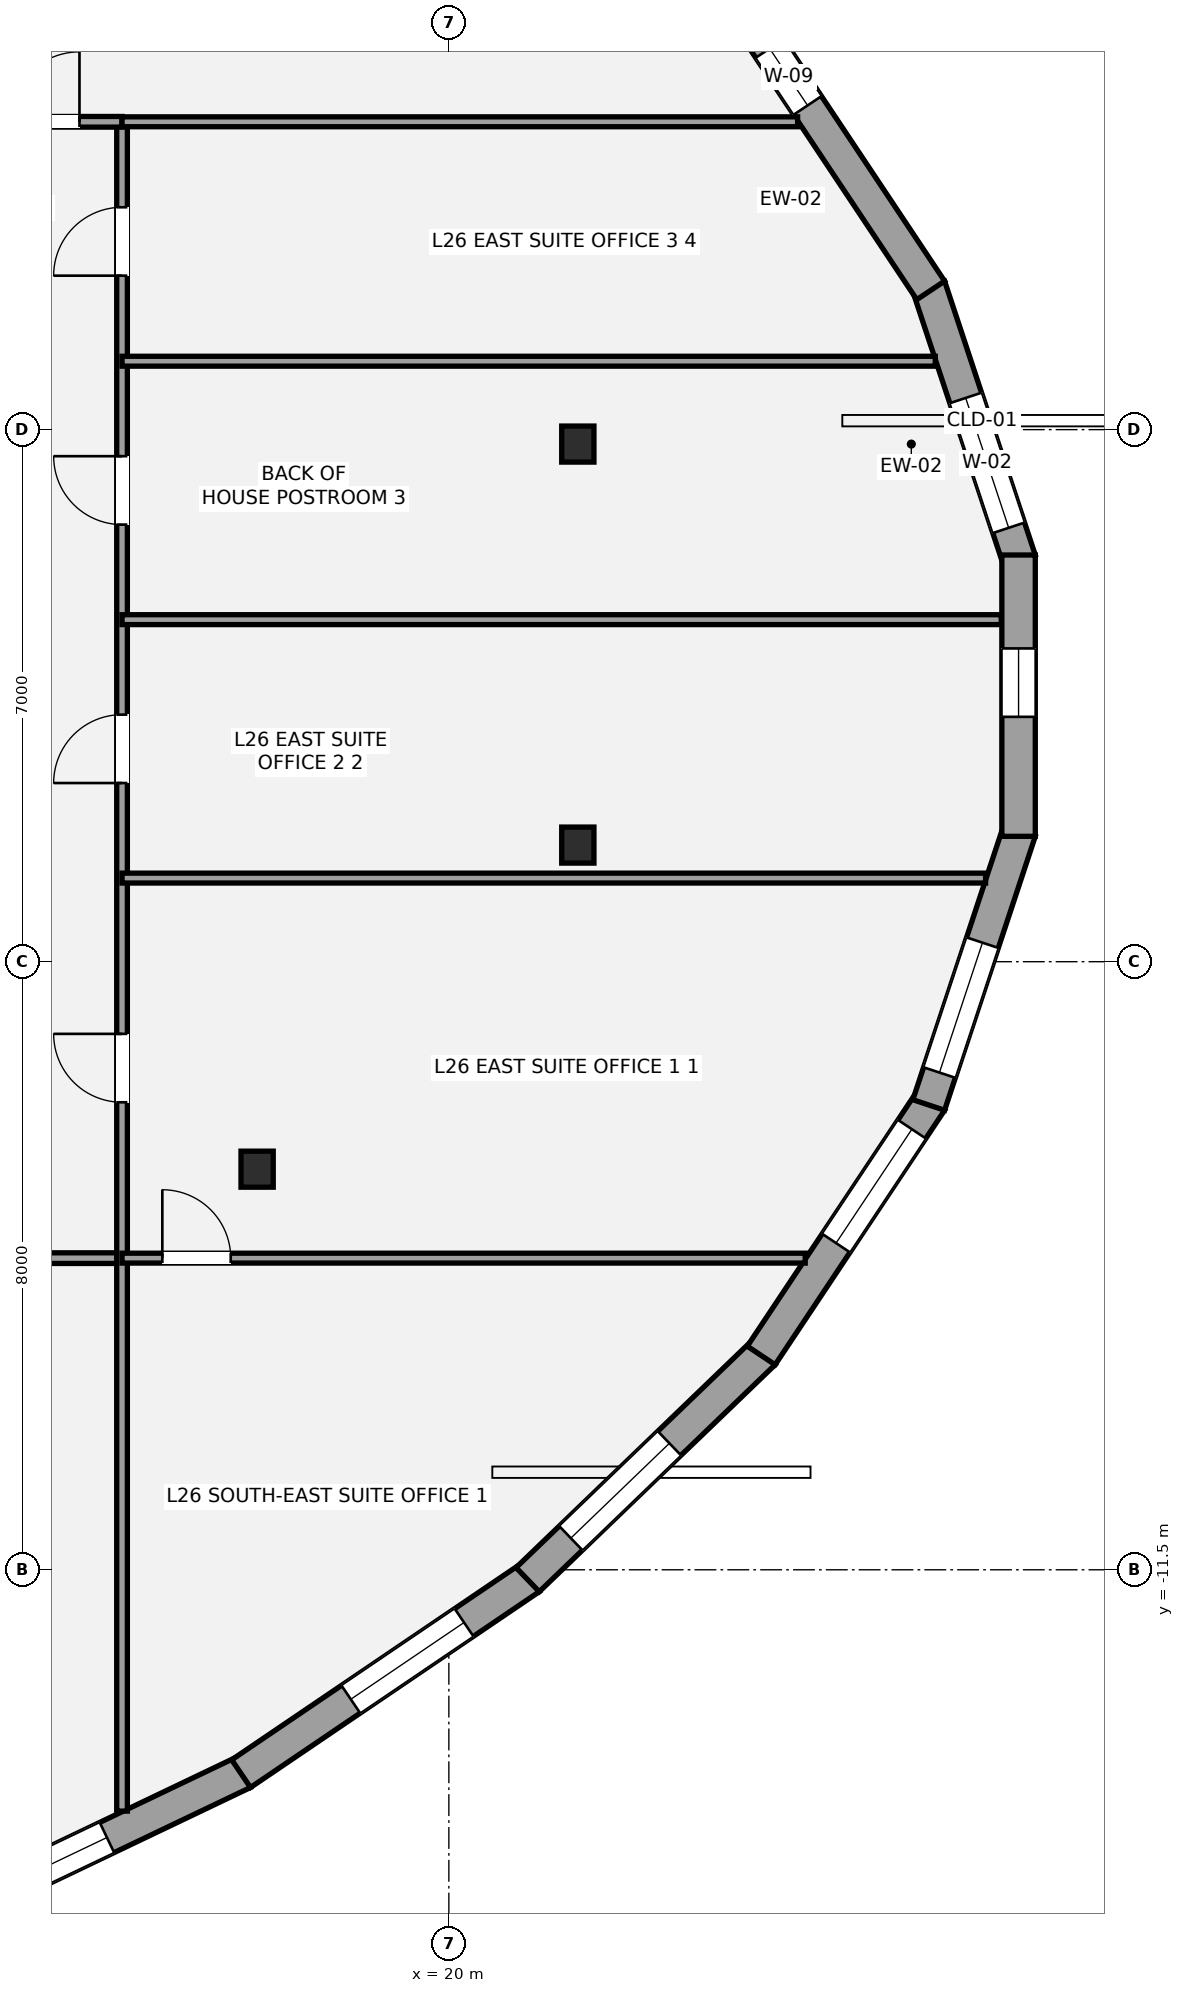
"""IFC4 building model, lengths in metres.
Left out: names, types, materials, properties, quantities, classifications, styles, units other than length and angle.
Written with IfcOpenShell. Run it as: python <this file> out.ifc"""

import sys

from ifc_helpers import new_model, si_unit, direction, frame, frame_2d, origin, origin_2d, place, context, subcontext, project, spatial, rectangle, i_section, extrude, element, fill, save


model = new_model("IFC4")
c1 = context("Model", 3, precision=1e-05, world=origin(), true_north=direction((0.0, 1.0)))
c2 = subcontext(c1, "Body", "Model", "MODEL_VIEW")
j1 = project(units=[si_unit("LENGTHUNIT", "METRE"), si_unit("PLANEANGLEUNIT", "RADIAN")], contexts=[c1])
p1 = place(None, origin())
s1 = spatial("IfcSite", under=j1, at=p1, CompositionType="ELEMENT")
p2 = place(p1, origin())
s2 = spatial("IfcBuilding", under=s1, at=p2, CompositionType="ELEMENT")
p3 = place(p2, frame((0.0, 0.0, 100.1)))
s3 = spatial("IfcBuildingStorey", under=s2, at=p3, CompositionType="ELEMENT", Elevation=100.1)
for number, where, z_axis, x_axis in (
    (1, (21.697, 3.31, 0.0), (0.0, 0.0, 1.0), (1.0, 0.0, 0.0)),
    (2, (17.477, -6.229, 0.0), (0.0, 0.0, 1.0), (1.0, 0.0, 0.0)),
    (3, (21.697, -1.966, 0.0), (0.0, 0.0, 1.0), (1.0, 0.0, 0.0)),
):
    element("IfcColumn", number, at=place(p3, frame(where, z_axis=z_axis, x_axis=x_axis)), inside=s3, PredefinedType="COLUMN", context=c2, shape_type="SweptSolid", body=[
        extrude(i_section(OverallWidth=0.424, OverallDepth=0.474, WebThickness=0.048, FlangeThickness=0.077, at=origin_2d()), origin(), (0.0, 0.0, 1.0), 3.5),
    ])
p4 = place(p3, frame((26.314, 5.385, 0.0), z_axis=(0.0, 0.0, 1.0), x_axis=(0.314316911692, -0.94931811266, 0.0)))
e4 = element("IfcWall", 4, at=p4, inside=s3, PredefinedType="STANDARD", context=c2, shape_type="SweptSolid", body=[
    extrude(rectangle(XDim=3.796, YDim=0.44, at=frame_2d((1.898, 0.0))), origin(), (0.0, 0.0, 1.0), 2.528),
])
p5 = place(p4, frame((1.547, 0.0, 0.65)))
e5 = element("IfcOpeningElement", 5, at=p5, cuts=e4, PredefinedType="OPENING", context=c2, shape_type="SweptSolid", body=[
    extrude(rectangle(XDim=1.8, YDim=1.7, at=frame_2d((0.9, 0.85))), frame((0.0, 0.23, 0.0), z_axis=(0.0, -1.0, 0.0), x_axis=(1.0, 0.0, 0.0)), (0.0, 0.0, 1.0), 0.46),
])
p6 = place(p3, frame((24.11, 8.68, 0.0), z_axis=(0.0, 0.0, 1.0), x_axis=(0.554293965046, -0.83232097193, 0.0)))
e6 = element("IfcWall", 6, at=p6, inside=s3, PredefinedType="STANDARD", context=c2, shape_type="SweptSolid", body=[
    extrude(rectangle(XDim=4.023, YDim=0.44, at=frame_2d((2.011, 0.0))), origin(), (0.0, 0.0, 1.0), 2.528),
])
p7 = place(p6, frame((0.2, 0.0, 0.58)))
e7 = element("IfcOpeningElement", 7, at=p7, cuts=e6, PredefinedType="OPENING", context=c2, shape_type="SweptSolid", body=[
    extrude(rectangle(XDim=0.9, YDim=1.35, at=frame_2d((0.45, 0.675))), frame((0.0, 0.23, 0.0), z_axis=(0.0, -1.0, 0.0), x_axis=(1.0, 0.0, 0.0)), (0.0, 0.0, 1.0), 0.46),
])
p8 = place(p3, frame((17.295, -14.166, 0.0), z_axis=(0.0, 0.0, 1.0), x_axis=(-0.902372757907, -0.430956385018, 0.0)))
e8 = element("IfcWall", 8, at=p8, inside=s3, PredefinedType="STANDARD", context=c2, shape_type="SweptSolid", body=[
    extrude(rectangle(XDim=4.882, YDim=0.44, at=frame_2d((2.441, 0.0))), origin(), (0.0, 0.0, 1.0), 2.528),
])
p9 = place(p8, frame((1.988, 0.0, 0.65)))
e9 = element("IfcOpeningElement", 9, at=p9, cuts=e8, PredefinedType="OPENING", context=c2, shape_type="SweptSolid", body=[
    extrude(rectangle(XDim=1.8, YDim=1.7, at=frame_2d((0.9, 0.85))), frame((0.0, 0.23, 0.0), z_axis=(0.0, -1.0, 0.0), x_axis=(1.0, 0.0, 0.0)), (0.0, 0.0, 1.0), 0.46),
])
p10 = place(p3, frame((21.066, -11.606, 0.0), z_axis=(0.0, 0.0, 1.0), x_axis=(-0.827754551165, -0.56109036975, 0.0)))
e10 = element("IfcWall", 10, at=p10, inside=s3, PredefinedType="STANDARD", context=c2, shape_type="SweptSolid", body=[
    extrude(rectangle(XDim=4.591, YDim=0.44, at=frame_2d((2.295, 0.0))), origin(), (0.0, 0.0, 1.0), 2.528),
])
p11 = place(p10, frame((1.047, 0.0, 0.65)))
e11 = element("IfcOpeningElement", 11, at=p11, cuts=e10, PredefinedType="OPENING", context=c2, shape_type="SweptSolid", body=[
    extrude(rectangle(XDim=1.8, YDim=1.7, at=frame_2d((0.9, 0.85))), frame((0.0, 0.23, 0.0), z_axis=(0.0, -1.0, 0.0), x_axis=(1.0, 0.0, 0.0)), (0.0, 0.0, 1.0), 0.46),
])
p12 = place(p3, frame((24.14, -8.644, 0.0), z_axis=(0.0, 0.0, 1.0), x_axis=(-0.720581378362, -0.693370375166, 0.0)))
e12 = element("IfcWall", 12, at=p12, inside=s3, PredefinedType="STANDARD", context=c2, shape_type="SweptSolid", body=[
    extrude(rectangle(XDim=4.307, YDim=0.44, at=frame_2d((2.153, 0.0))), origin(), (0.0, 0.0, 1.0), 2.528),
])
p13 = place(p12, frame((1.719, 0.0, 0.65)))
e13 = element("IfcOpeningElement", 13, at=p13, cuts=e12, PredefinedType="OPENING", context=c2, shape_type="SweptSolid", body=[
    extrude(rectangle(XDim=1.8, YDim=1.7, at=frame_2d((0.9, 0.85))), frame((0.0, 0.23, 0.0), z_axis=(0.0, -1.0, 0.0), x_axis=(1.0, 0.0, 0.0)), (0.0, 0.0, 1.0), 0.46),
])
p14 = place(p3, frame((26.34, -5.332, 0.0), z_axis=(0.0, 0.0, 1.0), x_axis=(-0.554293965046, -0.83232097193, 0.0)))
e14 = element("IfcWall", 14, at=p14, inside=s3, PredefinedType="STANDARD", context=c2, shape_type="SweptSolid", body=[
    extrude(rectangle(XDim=4.023, YDim=0.44, at=frame_2d((2.011, 0.0))), origin(), (0.0, 0.0, 1.0), 2.528),
])
p15 = place(p14, frame((0.446, 0.0, 0.65)))
e15 = element("IfcOpeningElement", 15, at=p15, cuts=e14, PredefinedType="OPENING", context=c2, shape_type="SweptSolid", body=[
    extrude(rectangle(XDim=1.8, YDim=1.7, at=frame_2d((0.9, 0.85))), frame((0.0, 0.23, 0.0), z_axis=(0.0, -1.0, 0.0), x_axis=(1.0, 0.0, 0.0)), (0.0, 0.0, 1.0), 0.46),
])
p16 = place(p3, frame((27.507, -1.781, 0.0), z_axis=(0.0, 0.0, 1.0), x_axis=(-0.314316911692, -0.94931811266, 0.0)))
e16 = element("IfcWall", 16, at=p16, inside=s3, PredefinedType="STANDARD", context=c2, shape_type="SweptSolid", body=[
    extrude(rectangle(XDim=3.796, YDim=0.44, at=frame_2d((1.898, 0.0))), origin(), (0.0, 0.0, 1.0), 2.528),
])
p17 = place(p16, frame((1.547, 0.0, 0.65)))
e17 = element("IfcOpeningElement", 17, at=p17, cuts=e16, PredefinedType="OPENING", context=c2, shape_type="SweptSolid", body=[
    extrude(rectangle(XDim=1.8, YDim=1.7, at=frame_2d((0.9, 0.85))), frame((0.0, 0.23, 0.0), z_axis=(0.0, -1.0, 0.0), x_axis=(1.0, 0.0, 0.0)), (0.0, 0.0, 1.0), 0.46),
])
p18 = place(p3, frame((27.496, 1.851, 0.0), z_axis=(0.0, 0.0, 1.0), x_axis=(0.0, -1.0, 0.0)))
e18 = element("IfcWall", 18, at=p18, inside=s3, PredefinedType="STANDARD", context=c2, shape_type="SweptSolid", body=[
    extrude(rectangle(XDim=3.701, YDim=0.44, at=frame_2d((1.851, 0.0))), origin(), (0.0, 0.0, 1.0), 2.528),
])
p19 = place(p18, frame((1.229, 0.0, 0.58)))
e19 = element("IfcOpeningElement", 19, at=p19, cuts=e18, PredefinedType="OPENING", context=c2, shape_type="SweptSolid", body=[
    extrude(rectangle(XDim=0.9, YDim=1.35, at=frame_2d((0.45, 0.675))), frame((0.0, 0.23, 0.0), z_axis=(0.0, -1.0, 0.0), x_axis=(1.0, 0.0, 0.0)), (0.0, 0.0, 1.0), 0.46),
])
p20 = place(p3, frame((-17.5, -7.4, 0.0), z_axis=(0.0, 0.0, 1.0), x_axis=(1.0, 0.0, 0.0)))
e20 = element("IfcWall", 20, at=p20, inside=s3, PredefinedType="PARTITIONING", context=c2, shape_type="SweptSolid", body=[
    extrude(rectangle(XDim=33.2, YDim=0.14, at=frame_2d((16.6, 0.0))), origin(), (0.0, 0.0, 1.0), 2.688),
])
p21 = place(p20, frame((6.3, 0.0, 0.0)))
e21 = element("IfcOpeningElement", 21, at=p21, cuts=e20, PredefinedType="OPENING", context=c2, shape_type="SweptSolid", body=[
    extrude(rectangle(XDim=0.9, YDim=2.1, at=frame_2d((0.45, 1.05))), frame((0.0, 0.08, 0.0), z_axis=(0.0, -1.0, 0.0), x_axis=(1.0, 0.0, 0.0)), (0.0, 0.0, 1.0), 0.16),
])
p22 = place(p20, frame((18.05, 0.0, 0.0)))
e22 = element("IfcOpeningElement", 22, at=p22, cuts=e20, PredefinedType="OPENING", context=c2, shape_type="SweptSolid", body=[
    extrude(rectangle(XDim=0.9, YDim=2.1, at=frame_2d((0.45, 1.05))), frame((0.0, 0.08, 0.0), z_axis=(0.0, -1.0, 0.0), x_axis=(1.0, 0.0, 0.0)), (0.0, 0.0, 1.0), 0.16),
])
p23 = place(p20, frame((27.9, 0.0, 0.0)))
e23 = element("IfcOpeningElement", 23, at=p23, cuts=e20, PredefinedType="OPENING", context=c2, shape_type="SweptSolid", body=[
    extrude(rectangle(XDim=0.9, YDim=2.1, at=frame_2d((0.45, 1.05))), frame((0.0, 0.08, 0.0), z_axis=(0.0, -1.0, 0.0), x_axis=(1.0, 0.0, 0.0)), (0.0, 0.0, 1.0), 0.16),
])
p24 = place(p3, frame((15.7, -14.675, 0.0), z_axis=(0.0, 0.0, 1.0), x_axis=(0.0, 1.0, 0.0)))
e24 = element("IfcWall", 24, at=p24, inside=s3, PredefinedType="PARTITIONING", context=c2, shape_type="SweptSolid", body=[
    extrude(rectangle(XDim=22.225, YDim=0.14, at=frame_2d((11.112, 0.0))), origin(), (0.0, 0.0, 1.0), 2.763),
])
p25 = place(p24, frame((9.325, 0.0, 0.0)))
e25 = element("IfcOpeningElement", 25, at=p25, cuts=e24, PredefinedType="OPENING", context=c2, shape_type="SweptSolid", body=[
    extrude(rectangle(XDim=0.9, YDim=2.1, at=frame_2d((0.45, 1.05))), frame((0.0, 0.08, 0.0), z_axis=(0.0, -1.0, 0.0), x_axis=(1.0, 0.0, 0.0)), (0.0, 0.0, 1.0), 0.16),
])
p26 = place(p24, frame((13.525, 0.0, 0.0)))
e26 = element("IfcOpeningElement", 26, at=p26, cuts=e24, PredefinedType="OPENING", context=c2, shape_type="SweptSolid", body=[
    extrude(rectangle(XDim=0.9, YDim=2.1, at=frame_2d((0.45, 1.05))), frame((0.0, 0.08, 0.0), z_axis=(0.0, -1.0, 0.0), x_axis=(1.0, 0.0, 0.0)), (0.0, 0.0, 1.0), 0.16),
])
p27 = place(p24, frame((16.925, 0.0, 0.0)))
e27 = element("IfcOpeningElement", 27, at=p27, cuts=e24, PredefinedType="OPENING", context=c2, shape_type="SweptSolid", body=[
    extrude(rectangle(XDim=0.9, YDim=2.1, at=frame_2d((0.45, 1.05))), frame((0.0, 0.08, 0.0), z_axis=(0.0, -1.0, 0.0), x_axis=(1.0, 0.0, 0.0)), (0.0, 0.0, 1.0), 0.16),
])
p28 = place(p24, frame((20.2, 0.0, 0.0)))
e28 = element("IfcOpeningElement", 28, at=p28, cuts=e24, PredefinedType="OPENING", context=c2, shape_type="SweptSolid", body=[
    extrude(rectangle(XDim=0.9, YDim=2.1, at=frame_2d((0.45, 1.05))), frame((0.0, 0.08, 0.0), z_axis=(0.0, -1.0, 0.0), x_axis=(1.0, 0.0, 0.0)), (0.0, 0.0, 1.0), 0.16),
])
p29 = place(p3, frame((13.9, 7.55, 0.0), z_axis=(0.0, 0.0, 1.0), x_axis=(1.0, 0.0, 0.0)))
e29 = element("IfcWall", 29, at=p29, inside=s3, PredefinedType="PARTITIONING", context=c2, shape_type="SweptSolid", body=[
    extrude(rectangle(XDim=1.8, YDim=0.14, at=frame_2d((0.9, 0.0))), origin(), (0.0, 0.0, 1.0), 2.763),
])
p30 = place(p29, frame((0.32, 0.0, 0.0)))
e30 = element("IfcOpeningElement", 30, at=p30, cuts=e29, PredefinedType="OPENING", context=c2, shape_type="SweptSolid", body=[
    extrude(rectangle(XDim=0.92, YDim=2.15, at=frame_2d((0.46, 1.075))), frame((0.0, 0.08, 0.0), z_axis=(0.0, -1.0, 0.0), x_axis=(1.0, 0.0, 0.0)), (0.0, 0.0, 1.0), 0.16),
])
p31 = place(p3, frame((15.7, 7.55, 0.0), z_axis=(0.0, 0.0, 1.0), x_axis=(1.0, 0.0, 0.0)))
e31 = element("IfcWall", 31, at=p31, inside=s3, PredefinedType="PARTITIONING", context=c2, shape_type="SweptSolid", body=[
    extrude(rectangle(XDim=8.889, YDim=0.13, at=frame_2d((4.444, 0.0))), origin(), (0.0, 0.0, 1.0), 2.763),
])
p32 = place(p3, frame((15.7, -7.4, 0.0), z_axis=(0.0, 0.0, 1.0), x_axis=(1.0, 0.0, 0.0)))
e32 = element("IfcWall", 32, at=p32, inside=s3, PredefinedType="PARTITIONING", context=c2, shape_type="SweptSolid", body=[
    extrude(rectangle(XDim=8.989, YDim=0.13, at=frame_2d((4.494, 0.0))), origin(), (0.0, 0.0, 1.0), 2.763),
])
p33 = place(p32, frame((0.53, 0.0, 0.0)))
e33 = element("IfcOpeningElement", 33, at=p33, cuts=e32, PredefinedType="OPENING", context=c2, shape_type="SweptSolid", body=[
    extrude(rectangle(XDim=0.9, YDim=2.1, at=frame_2d((0.45, 1.05))), frame((0.0, 0.075, 0.0), z_axis=(0.0, -1.0, 0.0), x_axis=(1.0, 0.0, 0.0)), (0.0, 0.0, 1.0), 0.15),
])
p34 = place(p3, frame((15.7, -2.4, 0.0), z_axis=(0.0, 0.0, 1.0), x_axis=(1.0, 0.0, 0.0)))
e34 = element("IfcWall", 34, at=p34, inside=s3, PredefinedType="PARTITIONING", context=c2, shape_type="SweptSolid", body=[
    extrude(rectangle(XDim=11.362, YDim=0.13, at=frame_2d((5.681, 0.0))), origin(), (0.0, 0.0, 1.0), 2.688),
])
p35 = place(p3, frame((15.7, 1.0, 0.0), z_axis=(0.0, 0.0, 1.0), x_axis=(1.0, 0.0, 0.0)))
e35 = element("IfcWall", 35, at=p35, inside=s3, PredefinedType="PARTITIONING", context=c2, shape_type="SweptSolid", body=[
    extrude(rectangle(XDim=11.568, YDim=0.13, at=frame_2d((5.784, 0.0))), origin(), (0.0, 0.0, 1.0), 2.763),
])
p36 = place(p3, frame((15.7, 4.4, 0.0), z_axis=(0.0, 0.0, 1.0), x_axis=(1.0, 0.0, 0.0)))
e36 = element("IfcWall", 36, at=p36, inside=s3, PredefinedType="PARTITIONING", context=c2, shape_type="SweptSolid", body=[
    extrude(rectangle(XDim=10.7, YDim=0.13, at=frame_2d((5.35, 0.0))), origin(), (0.0, 0.0, 1.0), 2.763),
])
p37 = place(p5, origin())
e37 = element("IfcWindow", 37, at=p37, inside=s3, PartitioningType="SINGLE_PANEL", PredefinedType="WINDOW", context=c2, shape_type="SweptSolid", body=[
    extrude(rectangle(XDim=1.8, YDim=1.7, at=frame_2d((0.9, 0.85))), frame((0.0, -0.01, 0.0), z_axis=(0.0, -1.0, 0.0), x_axis=(1.0, 0.0, 0.0)), (0.0, 0.0, 1.0), 0.06),
])
fill(e5, e37)
p38 = place(p7, origin())
e38 = element("IfcWindow", 38, at=p38, inside=s3, PartitioningType="SINGLE_PANEL", PredefinedType="WINDOW", context=c2, shape_type="SweptSolid", body=[
    extrude(rectangle(XDim=0.9, YDim=1.35, at=frame_2d((0.45, 0.675))), frame((0.0, -0.01, 0.0), z_axis=(0.0, -1.0, 0.0), x_axis=(1.0, 0.0, 0.0)), (0.0, 0.0, 1.0), 0.06),
])
fill(e7, e38)
p39 = place(p9, origin())
e39 = element("IfcWindow", 39, at=p39, inside=s3, PartitioningType="SINGLE_PANEL", PredefinedType="WINDOW", context=c2, shape_type="SweptSolid", body=[
    extrude(rectangle(XDim=1.8, YDim=1.7, at=frame_2d((0.9, 0.85))), frame((0.0, -0.01, 0.0), z_axis=(0.0, -1.0, 0.0), x_axis=(1.0, 0.0, 0.0)), (0.0, 0.0, 1.0), 0.06),
])
fill(e9, e39)
p40 = place(p11, origin())
e40 = element("IfcWindow", 40, at=p40, inside=s3, PartitioningType="SINGLE_PANEL", PredefinedType="WINDOW", context=c2, shape_type="SweptSolid", body=[
    extrude(rectangle(XDim=1.8, YDim=1.7, at=frame_2d((0.9, 0.85))), frame((0.0, -0.01, 0.0), z_axis=(0.0, -1.0, 0.0), x_axis=(1.0, 0.0, 0.0)), (0.0, 0.0, 1.0), 0.06),
])
fill(e11, e40)
p41 = place(p13, origin())
e41 = element("IfcWindow", 41, at=p41, inside=s3, PartitioningType="SINGLE_PANEL", PredefinedType="WINDOW", context=c2, shape_type="SweptSolid", body=[
    extrude(rectangle(XDim=1.8, YDim=1.7, at=frame_2d((0.9, 0.85))), frame((0.0, -0.01, 0.0), z_axis=(0.0, -1.0, 0.0), x_axis=(1.0, 0.0, 0.0)), (0.0, 0.0, 1.0), 0.06),
])
fill(e13, e41)
p42 = place(p15, origin())
e42 = element("IfcWindow", 42, at=p42, inside=s3, PartitioningType="SINGLE_PANEL", PredefinedType="WINDOW", context=c2, shape_type="SweptSolid", body=[
    extrude(rectangle(XDim=1.8, YDim=1.7, at=frame_2d((0.9, 0.85))), frame((0.0, -0.01, 0.0), z_axis=(0.0, -1.0, 0.0), x_axis=(1.0, 0.0, 0.0)), (0.0, 0.0, 1.0), 0.06),
])
fill(e15, e42)
p43 = place(p17, origin())
e43 = element("IfcWindow", 43, at=p43, inside=s3, PartitioningType="SINGLE_PANEL", PredefinedType="WINDOW", context=c2, shape_type="SweptSolid", body=[
    extrude(rectangle(XDim=1.8, YDim=1.7, at=frame_2d((0.9, 0.85))), frame((0.0, -0.01, 0.0), z_axis=(0.0, -1.0, 0.0), x_axis=(1.0, 0.0, 0.0)), (0.0, 0.0, 1.0), 0.06),
])
fill(e17, e43)
p44 = place(p19, origin())
e44 = element("IfcWindow", 44, at=p44, inside=s3, PartitioningType="SINGLE_PANEL", PredefinedType="WINDOW", context=c2, shape_type="SweptSolid", body=[
    extrude(rectangle(XDim=0.9, YDim=1.35, at=frame_2d((0.45, 0.675))), frame((0.0, -0.01, 0.0), z_axis=(0.0, -1.0, 0.0), x_axis=(1.0, 0.0, 0.0)), (0.0, 0.0, 1.0), 0.06),
])
fill(e19, e44)
p45 = place(p30, origin())
e45 = element("IfcDoor", 45, at=p45, inside=s3, OperationType="SINGLE_SWING_RIGHT", PredefinedType="DOOR", context=c2, shape_type="SweptSolid", body=[
    extrude(rectangle(XDim=0.92, YDim=2.15, at=frame_2d((0.46, 1.075))), frame((0.0, 0.025, 0.0), z_axis=(0.0, -1.0, 0.0), x_axis=(1.0, 0.0, 0.0)), (0.0, 0.0, 1.0), 0.05),
])
fill(e30, e45)
p46 = place(p33, origin())
e46 = element("IfcDoor", 46, at=p46, inside=s3, OperationType="SINGLE_SWING_LEFT", PredefinedType="DOOR", context=c2, shape_type="SweptSolid", body=[
    extrude(rectangle(XDim=0.9, YDim=2.1, at=frame_2d((0.45, 1.05))), frame((0.0, 0.025, 0.0), z_axis=(0.0, -1.0, 0.0), x_axis=(1.0, 0.0, 0.0)), (0.0, 0.0, 1.0), 0.05),
])
fill(e33, e46)
p47 = place(p25, origin())
e47 = element("IfcDoor", 47, at=p47, inside=s3, OperationType="SINGLE_SWING_RIGHT", PredefinedType="DOOR", context=c2, shape_type="SweptSolid", body=[
    extrude(rectangle(XDim=0.9, YDim=2.1, at=frame_2d((0.45, 1.05))), frame((0.0, 0.025, 0.0), z_axis=(0.0, -1.0, 0.0), x_axis=(1.0, 0.0, 0.0)), (0.0, 0.0, 1.0), 0.05),
])
fill(e25, e47)
p48 = place(p26, origin())
e48 = element("IfcDoor", 48, at=p48, inside=s3, OperationType="SINGLE_SWING_LEFT", PredefinedType="DOOR", context=c2, shape_type="SweptSolid", body=[
    extrude(rectangle(XDim=0.9, YDim=2.1, at=frame_2d((0.45, 1.05))), frame((0.0, 0.025, 0.0), z_axis=(0.0, -1.0, 0.0), x_axis=(1.0, 0.0, 0.0)), (0.0, 0.0, 1.0), 0.05),
])
fill(e26, e48)
p49 = place(p27, origin())
e49 = element("IfcDoor", 49, at=p49, inside=s3, OperationType="SINGLE_SWING_RIGHT", PredefinedType="DOOR", context=c2, shape_type="SweptSolid", body=[
    extrude(rectangle(XDim=0.9, YDim=2.1, at=frame_2d((0.45, 1.05))), frame((0.0, 0.025, 0.0), z_axis=(0.0, -1.0, 0.0), x_axis=(1.0, 0.0, 0.0)), (0.0, 0.0, 1.0), 0.05),
])
fill(e27, e49)
p50 = place(p28, origin())
e50 = element("IfcDoor", 50, at=p50, inside=s3, OperationType="SINGLE_SWING_LEFT", PredefinedType="DOOR", context=c2, shape_type="SweptSolid", body=[
    extrude(rectangle(XDim=0.9, YDim=2.1, at=frame_2d((0.45, 1.05))), frame((0.0, 0.025, 0.0), z_axis=(0.0, -1.0, 0.0), x_axis=(1.0, 0.0, 0.0)), (0.0, 0.0, 1.0), 0.05),
])
fill(e28, e50)
save(model, sys.argv[1])
